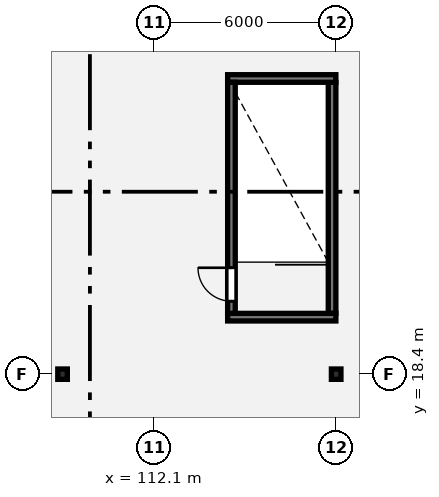
"""IFC4 building model, lengths in metres.
Left out: names, types, materials, properties, quantities, classifications, styles, units other than length and angle.
Written with IfcOpenShell. Run it as: python <this file> out.ifc"""

import sys

from ifc_helpers import new_model, si_unit, direction, frame, frame_2d, origin, origin_2d, place, context, subcontext, project, spatial, rectangle, i_section, extrude, element, fill, save


model = new_model("IFC4")
c1 = context("Model", 3, precision=1e-05, world=origin(), true_north=direction((0.0, 1.0)))
c2 = subcontext(c1, "Body", "Model", "MODEL_VIEW")
j1 = project(units=[si_unit("LENGTHUNIT", "METRE"), si_unit("PLANEANGLEUNIT", "RADIAN")], contexts=[c1])
p1 = place(None, origin())
s1 = spatial("IfcSite", under=j1, at=p1, CompositionType="ELEMENT")
p2 = place(p1, origin())
s2 = spatial("IfcBuilding", under=s1, at=p2, CompositionType="ELEMENT")
p3 = place(p2, frame((0.0, 0.0, 207.6)))
s3 = spatial("IfcBuildingStorey", under=s2, at=p3, CompositionType="ELEMENT", Elevation=207.6)
for number, where, z_axis, x_axis in (
    (1, (109.1, 18.4, 0.0), (0.0, 0.0, 1.0), (1.0, 0.0, 0.0)),
    (2, (118.1, 18.4, 0.0), (0.0, 0.0, 1.0), (1.0, 0.0, 0.0)),
):
    element("IfcColumn", number, at=place(p3, frame(where, z_axis=z_axis, x_axis=x_axis)), inside=s3, PredefinedType="COLUMN", context=c2, shape_type="SweptSolid", body=[
        extrude(i_section(OverallWidth=0.314, OverallDepth=0.34, WebThickness=0.019, FlangeThickness=0.031, FilletRadius=0.015, at=origin_2d()), origin(), (0.0, 0.0, 1.0), 14.15),
    ])
p4 = place(p3, frame((117.965, 20.4, 0.0), z_axis=(0.0, 0.0, 1.0), x_axis=(0.0, 1.0, 0.0)))
e3 = element("IfcWall", 3, at=p4, inside=s3, PredefinedType="SHEAR", context=c2, shape_type="SweptSolid", body=[
    extrude(rectangle(XDim=7.6, YDim=0.25, at=frame_2d((3.8, 0.0))), origin(), (0.0, 0.0, 1.0), 14.15),
])
for number, where, z_axis, x_axis in (
    (4, (114.53, 20.275, 0.0), (0.0, 0.0, 1.0), (1.0, 0.0, 0.0)),
    (5, (114.53, 28.125, 0.0), (0.0, 0.0, 1.0), (1.0, 0.0, 0.0)),
):
    element("IfcWall", number, at=place(p3, frame(where, z_axis=z_axis, x_axis=x_axis)), inside=s3, PredefinedType="SHEAR", context=c2, shape_type="SweptSolid", body=[
        extrude(rectangle(XDim=3.56, YDim=0.25, at=frame_2d((1.78, 0.0))), origin(), (0.0, 0.0, 1.0), 14.15),
    ])
p5 = place(p3, frame((114.655, 20.4, 0.0), z_axis=(0.0, 0.0, 1.0), x_axis=(0.0, 1.0, 0.0)))
e6 = element("IfcWall", 6, at=p5, inside=s3, PredefinedType="SHEAR", context=c2, shape_type="SweptSolid", body=[
    extrude(rectangle(XDim=7.6, YDim=0.25, at=frame_2d((3.8, 0.0))), origin(), (0.0, 0.0, 1.0), 14.15),
])
p6 = place(p5, frame((0.4, 0.0, 0.0)))
e7 = element("IfcOpeningElement", 7, at=p6, cuts=e6, PredefinedType="OPENING", context=c2, shape_type="SweptSolid", body=[
    extrude(rectangle(XDim=1.1, YDim=2.1, at=frame_2d((0.55, 1.05))), frame((0.0, 0.135, 0.0), z_axis=(0.0, -1.0, 0.0), x_axis=(1.0, 0.0, 0.0)), (0.0, 0.0, 1.0), 0.27),
])
p7 = place(p6, origin())
e8 = element("IfcDoor", 8, at=p7, inside=s3, OperationType="SINGLE_SWING_RIGHT", PredefinedType="DOOR", context=c2, shape_type="SweptSolid", body=[
    extrude(rectangle(XDim=1.1, YDim=2.1, at=frame_2d((0.55, 1.05))), frame((0.0, 0.025, 0.0), z_axis=(0.0, -1.0, 0.0), x_axis=(1.0, 0.0, 0.0)), (0.0, 0.0, 1.0), 0.05),
])
fill(e7, e8)
save(model, sys.argv[1])
